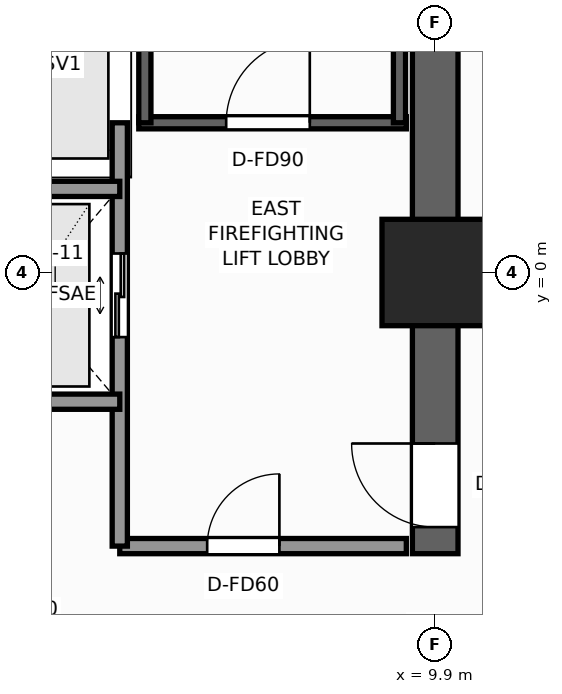
"""IFC4 building model, lengths in metres.
Left out: names, types, materials, properties, quantities, classifications, styles, units other than length and angle.
Written with IfcOpenShell. Run it as: python <this file> out.ifc"""

import sys

from ifc_helpers import new_model, si_unit, direction, frame, frame_2d, origin, origin_2d, place, context, subcontext, project, spatial, rectangle, extrude, element, fill, save


model = new_model("IFC4")
c1 = context("Model", 3, precision=1e-05, world=origin(), true_north=direction((0.0, 1.0)))
c2 = subcontext(c1, "Body", "Model", "MODEL_VIEW")
j1 = project(units=[si_unit("LENGTHUNIT", "METRE"), si_unit("PLANEANGLEUNIT", "RADIAN")], contexts=[c1])
p1 = place(None, origin())
s1 = spatial("IfcSite", under=j1, at=p1, CompositionType="ELEMENT")
p2 = place(p1, origin())
s2 = spatial("IfcBuilding", under=s1, at=p2, CompositionType="ELEMENT")
p3 = place(p2, frame((0.0, 0.0, 82.1)))
s3 = spatial("IfcBuildingStorey", under=s2, at=p3, CompositionType="ELEMENT", Elevation=82.1)
p4 = place(p3, frame((9.9, -3.7, 0.0), z_axis=(0.0, 0.0, 1.0), x_axis=(0.0, 1.0, 0.0)))
e1 = element("IfcWall", 1, at=p4, inside=s3, PredefinedType="SHEAR", context=c2, shape_type="SweptSolid", body=[
    extrude(rectangle(XDim=13.3, YDim=0.6, at=frame_2d((6.65, 0.0))), origin(), (0.0, 0.0, 1.0), 3.3),
])
p5 = place(p4, frame((0.35, 0.0, 0.0)))
e2 = element("IfcOpeningElement", 2, at=p5, cuts=e1, PredefinedType="OPENING", context=c2, shape_type="SweptSolid", body=[
    extrude(rectangle(XDim=1.1, YDim=2.2, at=frame_2d((0.55, 1.1))), frame((0.0, 0.31, 0.0), z_axis=(0.0, -1.0, 0.0), x_axis=(1.0, 0.0, 0.0)), (0.0, 0.0, 1.0), 0.62),
])
p6 = place(p3, frame((9.9, 0.0, 0.0), z_axis=(0.0, 0.0, 1.0), x_axis=(1.0, 0.0, 0.0)))
e3 = element("IfcColumn", 3, at=p6, inside=s3, PredefinedType="COLUMN", context=c2, shape_type="SweptSolid", body=[
    extrude(rectangle(XDim=1.4, YDim=1.4, at=origin_2d()), origin(), (0.0, 0.0, 1.0), 3.3),
])
p7 = place(p3, frame((6.0, 1.97, 0.0), z_axis=(0.0, 0.0, 1.0), x_axis=(1.0, 0.0, 0.0)))
e4 = element("IfcWall", 4, at=p7, inside=s3, PredefinedType="SHEAR", context=c2, shape_type="SweptSolid", body=[
    extrude(rectangle(XDim=3.52, YDim=0.16, at=frame_2d((1.76, 0.0))), origin(), (0.0, 0.0, 1.0), 3.3),
])
p8 = place(p7, frame((1.15, 0.0, 0.0)))
e5 = element("IfcOpeningElement", 5, at=p8, cuts=e4, PredefinedType="OPENING", context=c2, shape_type="SweptSolid", body=[
    extrude(rectangle(XDim=1.1, YDim=2.2, at=frame_2d((0.55, 1.1))), frame((0.0, 0.09, 0.0), z_axis=(0.0, -1.0, 0.0), x_axis=(1.0, 0.0, 0.0)), (0.0, 0.0, 1.0), 0.18),
])
for number, where, z_axis, x_axis in (
    (6, (6.08, 1.97, 0.0), (0.0, 0.0, 1.0), (0.0, 1.0, 0.0)),
    (7, (9.43, 1.97, 0.0), (0.0, 0.0, 1.0), (0.0, 1.0, 0.0)),
):
    element("IfcWall", number, at=place(p3, frame(where, z_axis=z_axis, x_axis=x_axis)), inside=s3, PredefinedType="SHEAR", context=c2, shape_type="SweptSolid", body=[
        extrude(rectangle(XDim=7.56, YDim=0.16, at=frame_2d((3.78, 0.0))), origin(), (0.0, 0.0, 1.0), 3.3),
    ])
p9 = place(p3, frame((5.75, -3.6, 0.0), z_axis=(0.0, 0.0, 1.0), x_axis=(1.0, 0.0, 0.0)))
e8 = element("IfcWall", 8, at=p9, inside=s3, PredefinedType="SOLIDWALL", context=c2, shape_type="SweptSolid", body=[
    extrude(rectangle(XDim=3.77, YDim=0.2, at=frame_2d((1.885, 0.0))), origin(), (0.0, 0.0, 1.0), 3.08),
])
p10 = place(p9, frame((1.15, 0.0, 0.0)))
e9 = element("IfcOpeningElement", 9, at=p10, cuts=e8, PredefinedType="OPENING", context=c2, shape_type="SweptSolid", body=[
    extrude(rectangle(XDim=0.95, YDim=2.06, at=frame_2d((0.475, 1.03))), frame((0.0, 0.11, 0.0), z_axis=(0.0, -1.0, 0.0), x_axis=(1.0, 0.0, 0.0)), (0.0, 0.0, 1.0), 0.22),
])
p11 = place(p3, frame((5.75, -3.6, 0.0), z_axis=(0.0, 0.0, 1.0), x_axis=(0.0, 1.0, 0.0)))
e10 = element("IfcWall", 10, at=p11, inside=s3, PredefinedType="SOLIDWALL", context=c2, shape_type="SweptSolid", body=[
    extrude(rectangle(XDim=5.57, YDim=0.2, at=frame_2d((2.785, 0.0))), origin(), (0.0, 0.0, 1.0), 3.08),
])
p12 = place(p11, frame((2.75, 0.0, 0.0)))
e11 = element("IfcOpeningElement", 11, at=p12, cuts=e10, PredefinedType="OPENING", context=c2, shape_type="SweptSolid", body=[
    extrude(rectangle(XDim=1.1, YDim=2.2, at=frame_2d((0.55, 1.1))), frame((0.0, 0.11, 0.0), z_axis=(0.0, -1.0, 0.0), x_axis=(1.0, 0.0, 0.0)), (0.0, 0.0, 1.0), 0.22),
])
for number, where, z_axis, x_axis in (
    (12, (3.35, -1.7, 0.0), (0.0, 0.0, 1.0), (1.0, 0.0, 0.0)),
    (13, (3.35, 1.1, 0.0), (0.0, 0.0, 1.0), (1.0, 0.0, 0.0)),
):
    element("IfcWall", number, at=place(p3, frame(where, z_axis=z_axis, x_axis=x_axis)), inside=s3, PredefinedType="SOLIDWALL", context=c2, shape_type="SweptSolid", body=[
        extrude(rectangle(XDim=2.4, YDim=0.2, at=frame_2d((1.2, 0.0))), origin(), (0.0, 0.0, 1.0), 3.08),
    ])
p13 = place(p8, origin())
e14 = element("IfcDoor", 14, at=p13, inside=s3, OperationType="SINGLE_SWING_RIGHT", PredefinedType="DOOR", context=c2, shape_type="SweptSolid", body=[
    extrude(rectangle(XDim=1.1, YDim=2.2, at=frame_2d((0.55, 1.1))), frame((0.0, 0.025, 0.0), z_axis=(0.0, -1.0, 0.0), x_axis=(1.0, 0.0, 0.0)), (0.0, 0.0, 1.0), 0.05),
])
fill(e5, e14)
p14 = place(p5, origin())
e15 = element("IfcDoor", 15, at=p14, inside=s3, OperationType="SINGLE_SWING_RIGHT", PredefinedType="DOOR", context=c2, shape_type="SweptSolid", body=[
    extrude(rectangle(XDim=1.1, YDim=2.2, at=frame_2d((0.55, 1.1))), frame((0.0, 0.025, 0.0), z_axis=(0.0, -1.0, 0.0), x_axis=(1.0, 0.0, 0.0)), (0.0, 0.0, 1.0), 0.05),
])
fill(e2, e15)
p15 = place(p12, origin())
e16 = element("IfcDoor", 16, at=p15, inside=s3, OperationType="DOUBLE_DOOR_SLIDING", PredefinedType="DOOR", context=c2, shape_type="SweptSolid", body=[
    extrude(rectangle(XDim=1.1, YDim=2.2, at=frame_2d((0.55, 1.1))), frame((0.0, 0.025, 0.0), z_axis=(0.0, -1.0, 0.0), x_axis=(1.0, 0.0, 0.0)), (0.0, 0.0, 1.0), 0.05),
])
fill(e11, e16)
p16 = place(p10, origin())
e17 = element("IfcDoor", 17, at=p16, inside=s3, OperationType="SINGLE_SWING_RIGHT", PredefinedType="DOOR", context=c2, shape_type="SweptSolid", body=[
    extrude(rectangle(XDim=0.95, YDim=2.06, at=frame_2d((0.475, 1.03))), frame((0.0, 0.025, 0.0), z_axis=(0.0, -1.0, 0.0), x_axis=(1.0, 0.0, 0.0)), (0.0, 0.0, 1.0), 0.05),
])
fill(e9, e17)
save(model, sys.argv[1])
